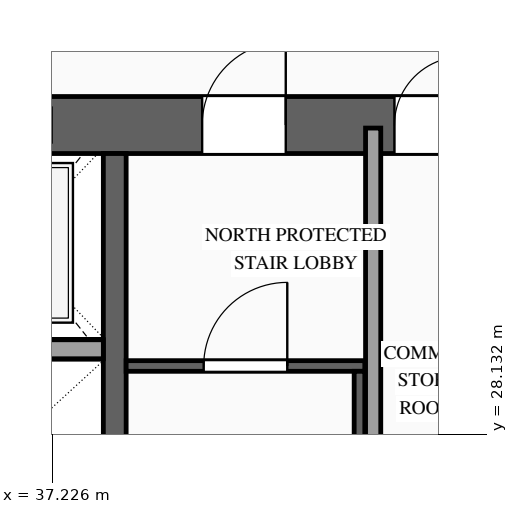
"""IFC4 building model, lengths in metres.
Left out: names, types, materials, properties, quantities, classifications, styles, units other than length and angle.
Written with IfcOpenShell. Run it as: python <this file> out.ifc"""

import sys

from ifc_helpers import new_model, si_unit, direction, frame, frame_2d, origin, place, context, subcontext, project, spatial, rectangle, extrude, source, transform, mapped, element, fill, save


model = new_model("IFC4")
c1 = context("Model", 3, precision=1e-05, world=origin(), true_north=direction((0.0, 1.0)))
c2 = subcontext(c1, "Body", "Model", "MODEL_VIEW")
j1 = project(units=[si_unit("LENGTHUNIT", "METRE"), si_unit("PLANEANGLEUNIT", "RADIAN")], contexts=[c1])
p1 = place(None, origin())
s1 = spatial("IfcSite", under=j1, at=p1, CompositionType="ELEMENT")
p2 = place(p1, origin())
s2 = spatial("IfcBuilding", under=s1, at=p2, CompositionType="ELEMENT")
p3 = place(p2, frame((0.0, 0.0, 119.0)))
s3 = spatial("IfcBuildingStorey", under=s2, at=p3, CompositionType="ELEMENT", Elevation=119.0)
p4 = place(p3, frame((23.425, 32.2, 0.0), z_axis=(0.0, 0.0, 1.0), x_axis=(1.0, 0.0, 0.0)))
e1 = element("IfcWall", 1, at=p4, inside=s3, PredefinedType="SHEAR", context=c2, shape_type="SweptSolid", body=[
    extrude(rectangle(XDim=27.15, YDim=0.75, at=frame_2d((13.575, 0.0))), origin(), (0.0, 0.0, 1.0), 3.6),
])
p5 = place(p4, frame((4.645, 0.0, 0.0)))
e2 = element("IfcOpeningElement", 2, at=p5, cuts=e1, PredefinedType="OPENING", context=c2, shape_type="SweptSolid", body=[
    extrude(rectangle(XDim=0.9, YDim=2.15, at=frame_2d((0.45, 1.075))), frame((0.0, 0.39, 0.0), z_axis=(0.0, -1.0, 0.0), x_axis=(1.0, 0.0, 0.0)), (0.0, 0.0, 1.0), 0.78),
])
p6 = place(p4, frame((9.925, 0.0, 0.0)))
e3 = element("IfcOpeningElement", 3, at=p6, cuts=e1, PredefinedType="OPENING", context=c2, shape_type="SweptSolid", body=[
    extrude(rectangle(XDim=1.1, YDim=2.2, at=frame_2d((0.55, 1.1))), frame((0.0, 0.39, 0.0), z_axis=(0.0, -1.0, 0.0), x_axis=(1.0, 0.0, 0.0)), (0.0, 0.0, 1.0), 0.78),
])
p7 = place(p4, frame((15.775, 0.0, 0.0)))
e4 = element("IfcOpeningElement", 4, at=p7, cuts=e1, PredefinedType="OPENING", context=c2, shape_type="SweptSolid", body=[
    extrude(rectangle(XDim=1.1, YDim=2.2, at=frame_2d((0.55, 1.1))), frame((0.0, 0.39, 0.0), z_axis=(0.0, -1.0, 0.0), x_axis=(1.0, 0.0, 0.0)), (0.0, 0.0, 1.0), 0.78),
])
p8 = place(p4, frame((18.305, 0.0, 0.0)))
e5 = element("IfcOpeningElement", 5, at=p8, cuts=e1, PredefinedType="OPENING", context=c2, shape_type="SweptSolid", body=[
    extrude(rectangle(XDim=0.9, YDim=2.15, at=frame_2d((0.45, 1.075))), frame((0.0, 0.39, 0.0), z_axis=(0.0, -1.0, 0.0), x_axis=(1.0, 0.0, 0.0)), (0.0, 0.0, 1.0), 0.78),
])
p9 = place(p4, frame((19.745, 0.0, 0.0)))
e6 = element("IfcOpeningElement", 6, at=p9, cuts=e1, PredefinedType="OPENING", context=c2, shape_type="SweptSolid", body=[
    extrude(rectangle(XDim=0.9, YDim=2.15, at=frame_2d((0.45, 1.075))), frame((0.0, 0.39, 0.0), z_axis=(0.0, -1.0, 0.0), x_axis=(1.0, 0.0, 0.0)), (0.0, 0.0, 1.0), 0.78),
])
m1 = source(origin(), c2, "Body", "SweptSolid", [
    extrude(rectangle(XDim=12.05, YDim=0.3, at=frame_2d((6.025, 0.0))), origin(), (0.0, 0.0, 1.0), 3.6),
])
p10 = place(p3, frame((38.05, 19.775, 0.0), z_axis=(0.0, 0.0, 1.0), x_axis=(0.0, 1.0, 0.0)))
e7 = element("IfcWall", 7, at=p10, inside=s3, PredefinedType="SOLIDWALL", context=c2, shape_type="MappedRepresentation", body=[
    mapped(m1, transform((0.0, 0.0, 0.0), scale=1.0)),
])
m2 = source(origin(), c2, "Body", "SweptSolid", [
    extrude(rectangle(XDim=2.4, YDim=0.25, at=frame_2d((1.2, 0.0))), origin(), (0.0, 0.0, 1.0), 3.38),
])
p11 = place(p3, frame((35.5, 29.25, 0.0), z_axis=(0.0, 0.0, 1.0), x_axis=(1.0, 0.0, 0.0)))
e8 = element("IfcWall", 8, at=p11, inside=s3, PredefinedType="SOLIDWALL", context=c2, shape_type="MappedRepresentation", body=[
    mapped(m2, transform((0.0, 0.0, 0.0), scale=1.0)),
])
p12 = place(p3, frame((38.2, 29.03, 0.0), z_axis=(0.0, 0.0, 1.0), x_axis=(1.0, 0.0, 0.0)))
e9 = element("IfcWall", 9, at=p12, inside=s3, PredefinedType="SOLIDWALL", context=c2, shape_type="SweptSolid", body=[
    extrude(rectangle(XDim=3.14, YDim=0.14, at=frame_2d((1.57, 0.0))), origin(), (0.0, 0.0, 1.0), 3.38),
])
p13 = place(p12, frame((1.02, 0.0, 0.0)))
e10 = element("IfcOpeningElement", 10, at=p13, cuts=e9, PredefinedType="OPENING", context=c2, shape_type="SweptSolid", body=[
    extrude(rectangle(XDim=1.1, YDim=2.2, at=frame_2d((0.55, 1.1))), frame((0.0, 0.085, 0.0), z_axis=(0.0, -1.0, 0.0), x_axis=(1.0, 0.0, 0.0)), (0.0, 0.0, 1.0), 0.17),
])
m3 = source(origin(), c2, "Body", "SweptSolid", [
    extrude(rectangle(XDim=8.94, YDim=0.14, at=frame_2d((4.47, 0.0))), origin(), (0.0, 0.0, 1.0), 3.38),
])
p14 = place(p3, frame((41.27, 20.02, 0.0), z_axis=(0.0, 0.0, 1.0), x_axis=(0.0, 1.0, 0.0)))
e11 = element("IfcWall", 11, at=p14, inside=s3, PredefinedType="SOLIDWALL", context=c2, shape_type="MappedRepresentation", body=[
    mapped(m3, transform((0.0, 0.0, 0.0), scale=1.0)),
])
m4 = source(origin(), c2, "Body", "SweptSolid", [
    extrude(rectangle(XDim=5.96, YDim=0.2, at=frame_2d((2.98, 0.0))), origin(), (0.0, 0.0, 1.0), 3.38),
])
p15 = place(p3, frame((41.45, 26.2, 0.0), z_axis=(0.0, 0.0, 1.0), x_axis=(0.0, 1.0, 0.0)))
e12 = element("IfcWall", 12, at=p15, inside=s3, PredefinedType="PARTITIONING", context=c2, shape_type="MappedRepresentation", body=[
    mapped(m4, transform((0.0, 0.0, 0.0), scale=1.0)),
])
m5 = source(origin(), c2, "Body", "SweptSolid", [
    extrude(rectangle(XDim=1.1, YDim=2.2, at=frame_2d((0.55, 1.1))), frame((0.0, 0.025, 0.0), z_axis=(0.0, -1.0, 0.0), x_axis=(1.0, 0.0, 0.0)), (0.0, 0.0, 1.0), 0.05),
])
p16 = place(p13, origin())
e13 = element("IfcDoor", 13, at=p16, inside=s3, OperationType="SINGLE_SWING_RIGHT", PredefinedType="DOOR", context=c2, shape_type="MappedRepresentation", body=[
    mapped(m5, transform((0.0, 0.0, 0.0), scale=1.0)),
])
fill(e10, e13)
p17 = place(p7, origin())
e14 = element("IfcDoor", 14, at=p17, inside=s3, OperationType="SINGLE_SWING_RIGHT", PredefinedType="DOOR", context=c2, shape_type="MappedRepresentation", body=[
    mapped(m5, transform((0.0, 0.0, 0.0), scale=1.0)),
])
fill(e4, e14)
m6 = source(origin(), c2, "Body", "SweptSolid", [
    extrude(rectangle(XDim=0.9, YDim=2.15, at=frame_2d((0.45, 1.075))), frame((0.0, 0.025, 0.0), z_axis=(0.0, -1.0, 0.0), x_axis=(1.0, 0.0, 0.0)), (0.0, 0.0, 1.0), 0.05),
])
p18 = place(p8, origin())
e15 = element("IfcDoor", 15, at=p18, inside=s3, OperationType="SINGLE_SWING_RIGHT", PredefinedType="DOOR", context=c2, shape_type="MappedRepresentation", body=[
    mapped(m6, transform((0.0, 0.0, 0.0), scale=1.0)),
])
fill(e5, e15)
save(model, sys.argv[1])
